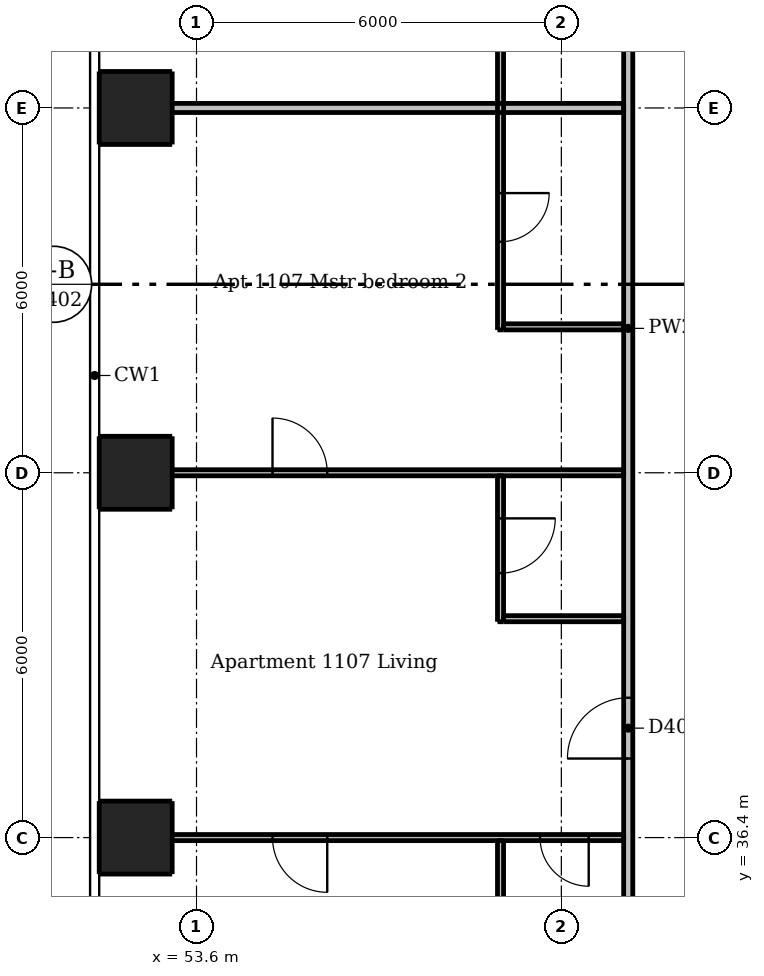
"""IFC4 building model, lengths in metres.
Left out: names, types, materials, properties, quantities, classifications, styles, units other than length and angle.
Written with IfcOpenShell. Run it as: python <this file> out.ifc"""

import sys

from ifc_helpers import new_model, si_unit, direction, frame, frame_2d, origin, origin_2d, place, context, subcontext, project, spatial, rectangle, extrude, element, fill, save


model = new_model("IFC4")
c1 = context("Model", 3, precision=1e-05, world=origin(), true_north=direction((0.0, 1.0)))
c2 = subcontext(c1, "Body", "Model", "MODEL_VIEW")
j1 = project(units=[si_unit("LENGTHUNIT", "METRE"), si_unit("PLANEANGLEUNIT", "RADIAN")], contexts=[c1])
p1 = place(None, origin())
s1 = spatial("IfcSite", under=j1, at=p1, CompositionType="ELEMENT")
p2 = place(p1, origin())
s2 = spatial("IfcBuilding", under=s1, at=p2, CompositionType="ELEMENT")
p3 = place(p2, frame((0.0, 0.0, 43.3)))
s3 = spatial("IfcBuildingStorey", under=s2, at=p3, CompositionType="ELEMENT", Elevation=43.3)
for number, where, z_axis, x_axis in (
    (1, (52.6, 36.4, 0.0), (0.0, 0.0, 1.0), (1.0, 0.0, 0.0)),
    (2, (52.6, 42.4, 0.0), (0.0, 0.0, 1.0), (1.0, 0.0, 0.0)),
    (3, (52.6, 48.4, 0.0), (0.0, 0.0, 1.0), (1.0, 0.0, 0.0)),
):
    element("IfcColumn", number, at=place(p3, frame(where, z_axis=z_axis, x_axis=x_axis)), inside=s3, PredefinedType="COLUMN", context=c2, shape_type="SweptSolid", body=[
        extrude(rectangle(XDim=1.2, YDim=1.2, at=origin_2d()), origin(), (0.0, 0.0, 1.0), 3.05),
    ])
p4 = place(p3, frame((58.6, 32.75, 0.0), z_axis=(0.0, 0.0, 1.0), x_axis=(0.0, 1.0, 0.0)))
e4 = element("IfcWall", 4, at=p4, inside=s3, PredefinedType="PARTITIONING", context=c2, shape_type="SweptSolid", body=[
    extrude(rectangle(XDim=3.6, YDim=0.1, at=frame_2d((1.8, 0.0))), origin(), (0.0, 0.0, 1.0), 3.05),
])
p5 = place(p3, frame((58.6, 42.35, 0.0), z_axis=(0.0, 0.0, 1.0), x_axis=(0.0, -1.0, 0.0)))
e5 = element("IfcWall", 5, at=p5, inside=s3, PredefinedType="PARTITIONING", context=c2, shape_type="SweptSolid", body=[
    extrude(rectangle(XDim=2.4, YDim=0.1, at=frame_2d((1.2, 0.0))), origin(), (0.0, 0.0, 1.0), 3.05),
])
p6 = place(p5, frame((0.7, 0.0, 0.0)))
e6 = element("IfcOpeningElement", 6, at=p6, cuts=e5, PredefinedType="OPENING", context=c2, shape_type="SweptSolid", body=[
    extrude(rectangle(XDim=0.9, YDim=2.1, at=frame_2d((0.45, 1.05))), frame((0.0, 0.06, 0.0), z_axis=(0.0, -1.0, 0.0), x_axis=(1.0, 0.0, 0.0)), (0.0, 0.0, 1.0), 0.12),
])
p7 = place(p3, frame((58.6, 54.35, 0.0), z_axis=(0.0, 0.0, 1.0), x_axis=(0.0, -1.0, 0.0)))
e7 = element("IfcWall", 7, at=p7, inside=s3, PredefinedType="PARTITIONING", context=c2, shape_type="SweptSolid", body=[
    extrude(rectangle(XDim=9.6, YDim=0.1, at=frame_2d((4.8, 0.0))), origin(), (0.0, 0.0, 1.0), 3.05),
])
p8 = place(p7, frame((7.35, 0.0, 0.0)))
e8 = element("IfcOpeningElement", 8, at=p8, cuts=e7, PredefinedType="OPENING", context=c2, shape_type="SweptSolid", body=[
    extrude(rectangle(XDim=0.8, YDim=2.1, at=frame_2d((0.4, 1.05))), frame((0.0, 0.06, 0.0), z_axis=(0.0, -1.0, 0.0), x_axis=(1.0, 0.0, 0.0)), (0.0, 0.0, 1.0), 0.12),
])
p9 = place(p7, frame((3.75, 0.0, 0.0)))
e9 = element("IfcOpeningElement", 9, at=p9, cuts=e7, PredefinedType="OPENING", context=c2, shape_type="SweptSolid", body=[
    extrude(rectangle(XDim=0.8, YDim=2.1, at=frame_2d((0.4, 1.05))), frame((0.0, 0.06, 0.0), z_axis=(0.0, -1.0, 0.0), x_axis=(1.0, 0.0, 0.0)), (0.0, 0.0, 1.0), 0.12),
])
p10 = place(p3, frame((58.65, 44.8, 0.0), z_axis=(0.0, 0.0, 1.0), x_axis=(1.0, 0.0, 0.0)))
e10 = element("IfcWall", 10, at=p10, inside=s3, PredefinedType="PARTITIONING", context=c2, shape_type="SweptSolid", body=[
    extrude(rectangle(XDim=1.975, YDim=0.1, at=frame_2d((0.988, 0.0))), origin(), (0.0, 0.0, 1.0), 3.05),
])
p11 = place(p3, frame((52.0, 42.4, 0.0), z_axis=(0.0, 0.0, 1.0), x_axis=(1.0, 0.0, 0.0)))
e11 = element("IfcWall", 11, at=p11, inside=s3, PredefinedType="PARTITIONING", context=c2, shape_type="SweptSolid", body=[
    extrude(rectangle(XDim=8.625, YDim=0.1, at=frame_2d((4.312, 0.0))), origin(), (0.0, 0.0, 1.0), 2.516),
])
p12 = place(p11, frame((2.85, 0.0, 0.0)))
e12 = element("IfcOpeningElement", 12, at=p12, cuts=e11, PredefinedType="OPENING", context=c2, shape_type="SweptSolid", body=[
    extrude(rectangle(XDim=0.9, YDim=2.1, at=frame_2d((0.45, 1.05))), frame((0.0, 0.06, 0.0), z_axis=(0.0, -1.0, 0.0), x_axis=(1.0, 0.0, 0.0)), (0.0, 0.0, 1.0), 0.12),
])
p13 = place(p3, frame((58.65, 40.0, 0.0), z_axis=(0.0, 0.0, 1.0), x_axis=(1.0, 0.0, 0.0)))
e13 = element("IfcWall", 13, at=p13, inside=s3, PredefinedType="PARTITIONING", context=c2, shape_type="SweptSolid", body=[
    extrude(rectangle(XDim=1.975, YDim=0.1, at=frame_2d((0.988, 0.0))), origin(), (0.0, 0.0, 1.0), 3.05),
])
p14 = place(p3, frame((60.625, 36.4, 0.0), z_axis=(0.0, 0.0, 1.0), x_axis=(-1.0, 0.0, 0.0)))
e14 = element("IfcWall", 14, at=p14, inside=s3, PredefinedType="PARTITIONING", context=c2, shape_type="SweptSolid", body=[
    extrude(rectangle(XDim=8.625, YDim=0.1, at=frame_2d((4.312, 0.0))), origin(), (0.0, 0.0, 1.0), 2.516),
])
p15 = place(p14, frame((4.875, 0.0, 0.0)))
e15 = element("IfcOpeningElement", 15, at=p15, cuts=e14, PredefinedType="OPENING", context=c2, shape_type="SweptSolid", body=[
    extrude(rectangle(XDim=0.9, YDim=2.1, at=frame_2d((0.45, 1.05))), frame((0.0, 0.06, 0.0), z_axis=(0.0, -1.0, 0.0), x_axis=(1.0, 0.0, 0.0)), (0.0, 0.0, 1.0), 0.12),
])
p16 = place(p14, frame((0.575, 0.0, 0.0)))
e16 = element("IfcOpeningElement", 16, at=p16, cuts=e14, PredefinedType="OPENING", context=c2, shape_type="SweptSolid", body=[
    extrude(rectangle(XDim=0.8, YDim=2.1, at=frame_2d((0.4, 1.05))), frame((0.0, 0.06, 0.0), z_axis=(0.0, -1.0, 0.0), x_axis=(1.0, 0.0, 0.0)), (0.0, 0.0, 1.0), 0.12),
])
p17 = place(p3, frame((60.7, 30.325, 0.0), z_axis=(0.0, 0.0, 1.0), x_axis=(0.0, 1.0, 0.0)))
e17 = element("IfcWall", 17, at=p17, inside=s3, PredefinedType="PARTITIONING", context=c2, shape_type="SweptSolid", body=[
    extrude(rectangle(XDim=28.9, YDim=0.15, at=frame_2d((14.45, 0.0))), origin(), (0.0, 0.0, 1.0), 3.05),
])
p18 = place(p17, frame((7.375, 0.0, 0.0)))
e18 = element("IfcOpeningElement", 18, at=p18, cuts=e17, PredefinedType="OPENING", context=c2, shape_type="SweptSolid", body=[
    extrude(rectangle(XDim=1.0, YDim=2.1, at=frame_2d((0.5, 1.05))), frame((0.0, 0.085, 0.0), z_axis=(0.0, -1.0, 0.0), x_axis=(1.0, 0.0, 0.0)), (0.0, 0.0, 1.0), 0.17),
])
p19 = place(p17, frame((26.025, 0.0, 0.0)))
e19 = element("IfcOpeningElement", 19, at=p19, cuts=e17, PredefinedType="OPENING", context=c2, shape_type="SweptSolid", body=[
    extrude(rectangle(XDim=1.0, YDim=2.1, at=frame_2d((0.5, 1.05))), frame((0.0, 0.085, 0.0), z_axis=(0.0, -1.0, 0.0), x_axis=(1.0, 0.0, 0.0)), (0.0, 0.0, 1.0), 0.17),
])
p20 = place(p3, frame((52.0, 48.4, 0.0), z_axis=(0.0, 0.0, 1.0), x_axis=(1.0, 0.0, 0.0)))
e20 = element("IfcWall", 20, at=p20, inside=s3, PredefinedType="PARTITIONING", context=c2, shape_type="SweptSolid", body=[
    extrude(rectangle(XDim=8.625, YDim=0.15, at=frame_2d((4.312, 0.0))), origin(), (0.0, 0.0, 1.0), 2.516),
])
p21 = place(p18, origin())
e21 = element("IfcDoor", 21, at=p21, inside=s3, OperationType="SINGLE_SWING_LEFT", PredefinedType="DOOR", context=c2, shape_type="SweptSolid", body=[
    extrude(rectangle(XDim=1.0, YDim=2.1, at=frame_2d((0.5, 1.05))), frame((0.0, 0.025, 0.0), z_axis=(0.0, -1.0, 0.0), x_axis=(1.0, 0.0, 0.0)), (0.0, 0.0, 1.0), 0.05),
])
fill(e18, e21)
p22 = place(p6, origin())
e22 = element("IfcDoor", 22, at=p22, inside=s3, OperationType="SINGLE_SWING_LEFT", PredefinedType="DOOR", context=c2, shape_type="SweptSolid", body=[
    extrude(rectangle(XDim=0.9, YDim=2.1, at=frame_2d((0.45, 1.05))), frame((0.0, 0.025, 0.0), z_axis=(0.0, -1.0, 0.0), x_axis=(1.0, 0.0, 0.0)), (0.0, 0.0, 1.0), 0.05),
])
fill(e6, e22)
p23 = place(p15, origin())
e23 = element("IfcDoor", 23, at=p23, inside=s3, OperationType="SINGLE_SWING_LEFT", PredefinedType="DOOR", context=c2, shape_type="SweptSolid", body=[
    extrude(rectangle(XDim=0.9, YDim=2.1, at=frame_2d((0.45, 1.05))), frame((0.0, 0.025, 0.0), z_axis=(0.0, -1.0, 0.0), x_axis=(1.0, 0.0, 0.0)), (0.0, 0.0, 1.0), 0.05),
])
fill(e15, e23)
p24 = place(p16, origin())
e24 = element("IfcDoor", 24, at=p24, inside=s3, OperationType="SINGLE_SWING_LEFT", PredefinedType="DOOR", context=c2, shape_type="SweptSolid", body=[
    extrude(rectangle(XDim=0.8, YDim=2.1, at=frame_2d((0.4, 1.05))), frame((0.0, 0.025, 0.0), z_axis=(0.0, -1.0, 0.0), x_axis=(1.0, 0.0, 0.0)), (0.0, 0.0, 1.0), 0.05),
])
fill(e16, e24)
p25 = place(p12, origin())
e25 = element("IfcDoor", 25, at=p25, inside=s3, OperationType="SINGLE_SWING_LEFT", PredefinedType="DOOR", context=c2, shape_type="SweptSolid", body=[
    extrude(rectangle(XDim=0.9, YDim=2.1, at=frame_2d((0.45, 1.05))), frame((0.0, 0.025, 0.0), z_axis=(0.0, -1.0, 0.0), x_axis=(1.0, 0.0, 0.0)), (0.0, 0.0, 1.0), 0.05),
])
fill(e12, e25)
p26 = place(p8, origin())
e26 = element("IfcDoor", 26, at=p26, inside=s3, OperationType="SINGLE_SWING_LEFT", PredefinedType="DOOR", context=c2, shape_type="SweptSolid", body=[
    extrude(rectangle(XDim=0.8, YDim=2.1, at=frame_2d((0.4, 1.05))), frame((0.0, 0.025, 0.0), z_axis=(0.0, -1.0, 0.0), x_axis=(1.0, 0.0, 0.0)), (0.0, 0.0, 1.0), 0.05),
])
fill(e8, e26)
save(model, sys.argv[1])
